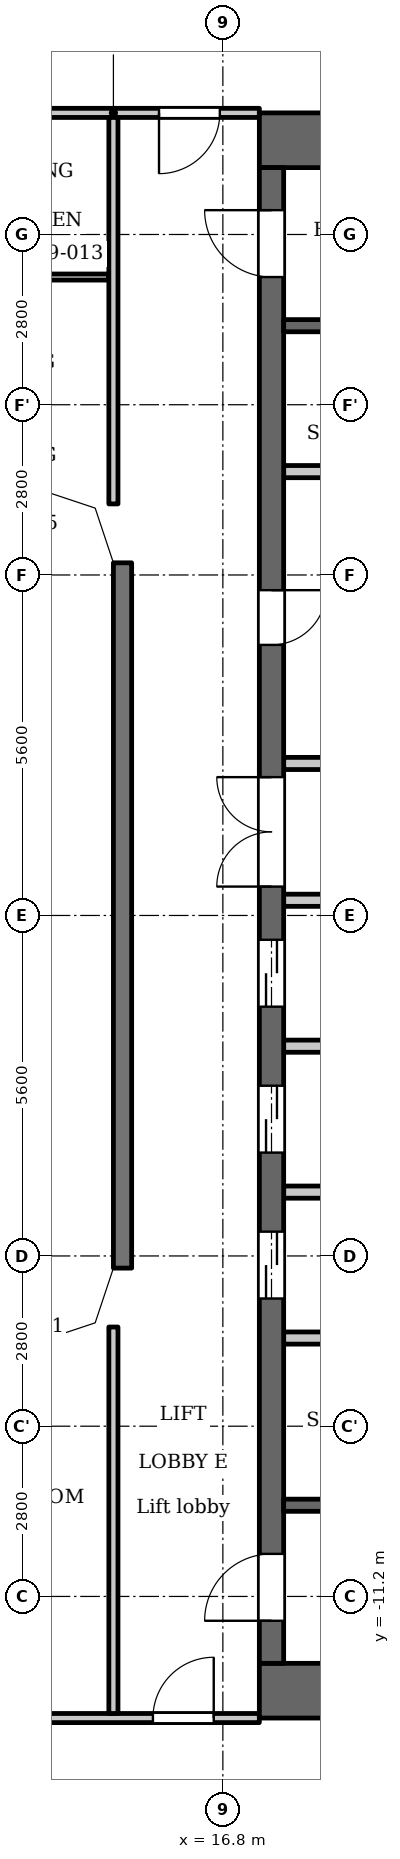
"""IFC4 building model, lengths in metres.
Left out: names, types, materials, properties, quantities, classifications, styles, units other than length and angle.
Written with IfcOpenShell. Run it as: python <this file> out.ifc"""

import sys

from ifc_helpers import new_model, si_unit, direction, frame, frame_2d, origin, place, context, subcontext, project, spatial, polyline, rectangle, outline, extrude, element, fill, save


model = new_model("IFC4")
c1 = context("Model", 3, precision=1e-05, world=origin(), true_north=direction((0.0, 1.0)))
c2 = subcontext(c1, "Body", "Model", "MODEL_VIEW")
j1 = project(units=[si_unit("LENGTHUNIT", "METRE"), si_unit("PLANEANGLEUNIT", "RADIAN")], contexts=[c1])
p1 = place(None, origin())
s1 = spatial("IfcSite", under=j1, at=p1, CompositionType="ELEMENT")
p2 = place(p1, origin())
s2 = spatial("IfcBuilding", under=s1, at=p2, CompositionType="ELEMENT")
p3 = place(p2, frame((0.0, 0.0, 114.8)))
s3 = spatial("IfcBuildingStorey", under=s2, at=p3, CompositionType="ELEMENT", Elevation=114.8)
p4 = place(p3, frame((15.15, 5.8, 0.0), z_axis=(0.0, 0.0, 1.0), x_axis=(0.0, -1.0, 0.0)))
e1 = element("IfcWall", 1, at=p4, inside=s3, PredefinedType="SOLIDWALL", context=c2, shape_type="SweptSolid", body=[
    extrude(rectangle(XDim=11.6, YDim=0.3, at=frame_2d((5.8, 0.0))), origin(), (0.0, 0.0, 1.0), 3.2),
])
for number, where, z_axis, x_axis in (
    (2, (17.4, 12.75, 0.0), (0.0, 0.0, 1.0), (1.0, 0.0, 0.0)),
    (3, (17.4, -12.75, 0.0), (0.0, 0.0, 1.0), (1.0, 0.0, 0.0)),
):
    element("IfcWall", number, at=place(p3, frame(where, z_axis=z_axis, x_axis=x_axis)), inside=s3, PredefinedType="SHEAR", context=c2, shape_type="SweptSolid", body=[
        extrude(rectangle(XDim=10.4, YDim=0.9, at=frame_2d((5.2, 0.0))), origin(), (0.0, 0.0, 1.0), 3.2),
    ])
p5 = place(p3, frame((17.6, -12.3, 0.0), z_axis=(0.0, 0.0, 1.0), x_axis=(0.0, 1.0, 0.0)))
e4 = element("IfcWall", 4, at=p5, inside=s3, PredefinedType="SHEAR", context=c2, shape_type="SweptSolid", body=[
    extrude(rectangle(XDim=24.6, YDim=0.4, at=frame_2d((12.3, 0.0))), origin(), (0.0, 0.0, 1.0), 3.2),
])
p6 = place(p5, frame((6.0, 0.0, 0.0)))
e5 = element("IfcOpeningElement", 5, at=p6, cuts=e4, PredefinedType="OPENING", context=c2, shape_type="SweptSolid", body=[
    extrude(rectangle(XDim=1.1, YDim=2.1, at=frame_2d((0.55, 1.05))), frame((0.0, 0.21, 0.0), z_axis=(0.0, -1.0, 0.0), x_axis=(1.0, 0.0, 0.0)), (0.0, 0.0, 1.0), 0.42),
])
p7 = place(p5, frame((8.4, 0.0, 0.0)))
e6 = element("IfcOpeningElement", 6, at=p7, cuts=e4, PredefinedType="OPENING", context=c2, shape_type="SweptSolid", body=[
    extrude(rectangle(XDim=1.1, YDim=2.1, at=frame_2d((0.55, 1.05))), frame((0.0, 0.21, 0.0), z_axis=(0.0, -1.0, 0.0), x_axis=(1.0, 0.0, 0.0)), (0.0, 0.0, 1.0), 0.42),
])
p8 = place(p5, frame((10.8, 0.0, 0.0)))
e7 = element("IfcOpeningElement", 7, at=p8, cuts=e4, PredefinedType="OPENING", context=c2, shape_type="SweptSolid", body=[
    extrude(rectangle(XDim=1.1, YDim=2.1, at=frame_2d((0.55, 1.05))), frame((0.0, 0.21, 0.0), z_axis=(0.0, -1.0, 0.0), x_axis=(1.0, 0.0, 0.0)), (0.0, 0.0, 1.0), 0.42),
])
p9 = place(p5, frame((16.75, 0.0, 0.0)))
e8 = element("IfcOpeningElement", 8, at=p9, cuts=e4, PredefinedType="OPENING", context=c2, shape_type="SweptSolid", body=[
    extrude(rectangle(XDim=0.9, YDim=2.1, at=frame_2d((0.45, 1.05))), frame((0.0, 0.21, 0.0), z_axis=(0.0, -1.0, 0.0), x_axis=(1.0, 0.0, 0.0)), (0.0, 0.0, 1.0), 0.42),
])
p10 = place(p5, frame((22.8, 0.0, 0.0)))
e9 = element("IfcOpeningElement", 9, at=p10, cuts=e4, PredefinedType="OPENING", context=c2, shape_type="SweptSolid", body=[
    extrude(rectangle(XDim=1.1, YDim=2.1, at=frame_2d((0.55, 1.05))), frame((0.0, 0.21, 0.0), z_axis=(0.0, -1.0, 0.0), x_axis=(1.0, 0.0, 0.0)), (0.0, 0.0, 1.0), 0.42),
])
p11 = place(p5, frame((0.7, 0.0, 0.0)))
e10 = element("IfcOpeningElement", 10, at=p11, cuts=e4, PredefinedType="OPENING", context=c2, shape_type="SweptSolid", body=[
    extrude(rectangle(XDim=1.1, YDim=2.1, at=frame_2d((0.55, 1.05))), frame((0.0, 0.21, 0.0), z_axis=(0.0, -1.0, 0.0), x_axis=(1.0, 0.0, 0.0)), (0.0, 0.0, 1.0), 0.42),
])
p12 = place(p5, frame((12.775, 0.0, 0.0)))
e11 = element("IfcOpeningElement", 11, at=p12, cuts=e4, PredefinedType="OPENING", context=c2, shape_type="SweptSolid", body=[
    extrude(rectangle(XDim=1.8, YDim=2.1, at=frame_2d((0.9, 1.05))), frame((0.0, 0.21, 0.0), z_axis=(0.0, -1.0, 0.0), x_axis=(1.0, 0.0, 0.0)), (0.0, 0.0, 1.0), 0.42),
])
p13 = place(p3, frame((17.8, -9.7, 0.0), z_axis=(0.0, 0.0, 1.0), x_axis=(1.0, 0.0, 0.0)))
e12 = element("IfcWall", 12, at=p13, inside=s3, PredefinedType="SHEAR", context=c2, shape_type="SweptSolid", body=[
    extrude(rectangle(XDim=8.3, YDim=0.2, at=frame_2d((4.15, 0.0))), origin(), (0.0, 0.0, 1.0), 3.2),
])
p14 = place(p13, frame((0.85, 0.0, 0.0)))
e13 = element("IfcOpeningElement", 13, at=p14, cuts=e12, PredefinedType="OPENING", context=c2, shape_type="SweptSolid", body=[
    extrude(rectangle(XDim=1.1, YDim=2.1, at=frame_2d((0.55, 1.05))), frame((0.0, 0.11, 0.0), z_axis=(0.0, -1.0, 0.0), x_axis=(1.0, 0.0, 0.0)), (0.0, 0.0, 1.0), 0.22),
])
p15 = place(p13, frame((3.75, 0.0, 0.0)))
e14 = element("IfcOpeningElement", 14, at=p15, cuts=e12, PredefinedType="OPENING", context=c2, shape_type="SweptSolid", body=[
    extrude(rectangle(XDim=1.1, YDim=2.1, at=frame_2d((0.55, 1.05))), frame((0.0, 0.11, 0.0), z_axis=(0.0, -1.0, 0.0), x_axis=(1.0, 0.0, 0.0)), (0.0, 0.0, 1.0), 0.22),
])
for number, where, z_axis, x_axis in (
    (15, (17.8, -6.95, 0.0), (0.0, 0.0, 1.0), (1.0, 0.0, 0.0)),
    (16, (17.8, -4.55, 0.0), (0.0, 0.0, 1.0), (1.0, 0.0, 0.0)),
    (17, (17.8, -2.15, 0.0), (0.0, 0.0, 1.0), (1.0, 0.0, 0.0)),
):
    element("IfcWall", number, at=place(p3, frame(where, z_axis=z_axis, x_axis=x_axis)), inside=s3, PredefinedType="PARTITIONING", context=c2, shape_type="SweptSolid", body=[
        extrude(rectangle(XDim=2.8, YDim=0.2, at=frame_2d((1.4, 0.0))), origin(), (0.0, 0.0, 1.0), 3.2),
    ])
for number, where, z_axis, x_axis in (
    (18, (17.8, 0.25, 0.0), (0.0, 0.0, 1.0), (1.0, 0.0, 0.0)),
    (19, (17.8, 2.5, 0.0), (0.0, 0.0, 1.0), (1.0, 0.0, 0.0)),
):
    element("IfcWall", number, at=place(p3, frame(where, z_axis=z_axis, x_axis=x_axis)), inside=s3, PredefinedType="PARTITIONING", context=c2, shape_type="SweptSolid", body=[
        extrude(rectangle(XDim=3.0, YDim=0.2, at=frame_2d((1.5, 0.0))), origin(), (0.0, 0.0, 1.0), 3.2),
    ])
p16 = place(p3, frame((17.8, 7.3, 0.0), z_axis=(0.0, 0.0, 1.0), x_axis=(1.0, 0.0, 0.0)))
e20 = element("IfcWall", 20, at=p16, inside=s3, PredefinedType="PARTITIONING", context=c2, shape_type="SweptSolid", body=[
    extrude(rectangle(XDim=2.8, YDim=0.2, at=frame_2d((1.4, 0.0))), origin(), (0.0, 0.0, 1.0), 3.2),
])
p17 = place(p3, frame((17.8, 9.7, 0.0), z_axis=(0.0, 0.0, 1.0), x_axis=(1.0, 0.0, 0.0)))
e21 = element("IfcWall", 21, at=p17, inside=s3, PredefinedType="SHEAR", context=c2, shape_type="SweptSolid", body=[
    extrude(rectangle(XDim=8.3, YDim=0.2, at=frame_2d((4.15, 0.0))), origin(), (0.0, 0.0, 1.0), 3.2),
])
p18 = place(p17, frame((0.85, 0.0, 0.0)))
e22 = element("IfcOpeningElement", 22, at=p18, cuts=e21, PredefinedType="OPENING", context=c2, shape_type="SweptSolid", body=[
    extrude(rectangle(XDim=1.1, YDim=2.1, at=frame_2d((0.55, 1.05))), frame((0.0, 0.11, 0.0), z_axis=(0.0, -1.0, 0.0), x_axis=(1.0, 0.0, 0.0)), (0.0, 0.0, 1.0), 0.22),
])
p19 = place(p17, frame((3.75, 0.0, 0.0)))
e23 = element("IfcOpeningElement", 23, at=p19, cuts=e21, PredefinedType="OPENING", context=c2, shape_type="SweptSolid", body=[
    extrude(rectangle(XDim=1.1, YDim=2.1, at=frame_2d((0.55, 1.05))), frame((0.0, 0.11, 0.0), z_axis=(0.0, -1.0, 0.0), x_axis=(1.0, 0.0, 0.0)), (0.0, 0.0, 1.0), 0.22),
])
p20 = place(p3, frame((-17.4, -13.2, 0.0), z_axis=(0.0, 0.0, 1.0), x_axis=(1.0, 0.0, 0.0)))
e24 = element("IfcWall", 24, at=p20, inside=s3, PredefinedType="PARTITIONING", context=c2, shape_type="SweptSolid", body=[
    extrude(rectangle(XDim=34.8, YDim=0.15, at=frame_2d((17.4, 0.0))), origin(), (0.0, 0.0, 1.0), 3.2),
])
p21 = place(p20, frame((0.65, 0.0, 0.0)))
e25 = element("IfcOpeningElement", 25, at=p21, cuts=e24, PredefinedType="OPENING", context=c2, shape_type="SweptSolid", body=[
    extrude(rectangle(XDim=1.0, YDim=2.1, at=frame_2d((0.5, 1.05))), frame((0.0, 0.085, 0.0), z_axis=(0.0, -1.0, 0.0), x_axis=(1.0, 0.0, 0.0)), (0.0, 0.0, 1.0), 0.17),
])
p22 = place(p20, frame((33.05, 0.0, 0.0)))
e26 = element("IfcOpeningElement", 26, at=p22, cuts=e24, PredefinedType="OPENING", context=c2, shape_type="SweptSolid", body=[
    extrude(rectangle(XDim=1.0, YDim=2.1, at=frame_2d((0.5, 1.05))), frame((0.0, 0.085, 0.0), z_axis=(0.0, -1.0, 0.0), x_axis=(1.0, 0.0, 0.0)), (0.0, 0.0, 1.0), 0.17),
])
p23 = place(p20, frame((4.55, 0.0, 0.0)))
e27 = element("IfcOpeningElement", 27, at=p23, cuts=e24, PredefinedType="OPENING", context=c2, shape_type="SweptSolid", body=[
    extrude(rectangle(XDim=1.0, YDim=2.1, at=frame_2d((0.5, 1.05))), frame((0.0, 0.085, 0.0), z_axis=(0.0, -1.0, 0.0), x_axis=(1.0, 0.0, 0.0)), (0.0, 0.0, 1.0), 0.17),
])
p24 = place(p20, frame((6.9, 0.0, 0.0)))
e28 = element("IfcOpeningElement", 28, at=p24, cuts=e24, PredefinedType="OPENING", context=c2, shape_type="SweptSolid", body=[
    extrude(rectangle(XDim=1.0, YDim=2.1, at=frame_2d((0.5, 1.05))), frame((0.0, 0.085, 0.0), z_axis=(0.0, -1.0, 0.0), x_axis=(1.0, 0.0, 0.0)), (0.0, 0.0, 1.0), 0.17),
])
p25 = place(p20, frame((15.75, 0.0, 0.0)))
e29 = element("IfcOpeningElement", 29, at=p25, cuts=e24, PredefinedType="OPENING", context=c2, shape_type="SweptSolid", body=[
    extrude(rectangle(XDim=1.0, YDim=2.1, at=frame_2d((0.5, 1.05))), frame((0.0, 0.085, 0.0), z_axis=(0.0, -1.0, 0.0), x_axis=(1.0, 0.0, 0.0)), (0.0, 0.0, 1.0), 0.17),
])
p26 = place(p20, frame((18.1, 0.0, 0.0)))
e30 = element("IfcOpeningElement", 30, at=p26, cuts=e24, PredefinedType="OPENING", context=c2, shape_type="SweptSolid", body=[
    extrude(rectangle(XDim=1.0, YDim=2.1, at=frame_2d((0.5, 1.05))), frame((0.0, 0.085, 0.0), z_axis=(0.0, -1.0, 0.0), x_axis=(1.0, 0.0, 0.0)), (0.0, 0.0, 1.0), 0.17),
])
p27 = place(p20, frame((26.95, 0.0, 0.0)))
e31 = element("IfcOpeningElement", 31, at=p27, cuts=e24, PredefinedType="OPENING", context=c2, shape_type="SweptSolid", body=[
    extrude(rectangle(XDim=1.0, YDim=2.1, at=frame_2d((0.5, 1.05))), frame((0.0, 0.085, 0.0), z_axis=(0.0, -1.0, 0.0), x_axis=(1.0, 0.0, 0.0)), (0.0, 0.0, 1.0), 0.17),
])
p28 = place(p20, frame((29.25, 0.0, 0.0)))
e32 = element("IfcOpeningElement", 32, at=p28, cuts=e24, PredefinedType="OPENING", context=c2, shape_type="SweptSolid", body=[
    extrude(rectangle(XDim=1.0, YDim=2.1, at=frame_2d((0.5, 1.05))), frame((0.0, 0.085, 0.0), z_axis=(0.0, -1.0, 0.0), x_axis=(1.0, 0.0, 0.0)), (0.0, 0.0, 1.0), 0.17),
])
p29 = place(p3, frame((-14.925, 10.5, 0.0), z_axis=(0.0, 0.0, 1.0), x_axis=(1.0, 0.0, 0.0)))
e33 = element("IfcWall", 33, at=p29, inside=s3, PredefinedType="PARTITIONING", context=c2, shape_type="SweptSolid", body=[
    extrude(rectangle(XDim=29.85, YDim=0.1, at=frame_2d((14.925, 0.0))), origin(), (0.0, 0.0, 1.0), 3.2),
])
p30 = place(p29, frame((0.525, 0.0, 0.0)))
e34 = element("IfcOpeningElement", 34, at=p30, cuts=e33, PredefinedType="OPENING", context=c2, shape_type="SweptSolid", body=[
    extrude(rectangle(XDim=0.8, YDim=2.1, at=frame_2d((0.4, 1.05))), frame((0.0, 0.06, 0.0), z_axis=(0.0, -1.0, 0.0), x_axis=(1.0, 0.0, 0.0)), (0.0, 0.0, 1.0), 0.12),
])
p31 = place(p29, frame((4.375, 0.0, 0.0)))
e35 = element("IfcOpeningElement", 35, at=p31, cuts=e33, PredefinedType="OPENING", context=c2, shape_type="SweptSolid", body=[
    extrude(rectangle(XDim=0.9, YDim=2.1, at=frame_2d((0.45, 1.05))), frame((0.0, 0.06, 0.0), z_axis=(0.0, -1.0, 0.0), x_axis=(1.0, 0.0, 0.0)), (0.0, 0.0, 1.0), 0.12),
])
p32 = place(p29, frame((18.825, 0.0, 0.0)))
e36 = element("IfcOpeningElement", 36, at=p32, cuts=e33, PredefinedType="OPENING", context=c2, shape_type="SweptSolid", body=[
    extrude(rectangle(XDim=0.8, YDim=2.1, at=frame_2d((0.4, 1.05))), frame((0.0, 0.06, 0.0), z_axis=(0.0, -1.0, 0.0), x_axis=(1.0, 0.0, 0.0)), (0.0, 0.0, 1.0), 0.12),
])
p33 = place(p29, frame((16.325, 0.0, 0.0)))
e37 = element("IfcOpeningElement", 37, at=p33, cuts=e33, PredefinedType="OPENING", context=c2, shape_type="SweptSolid", body=[
    extrude(rectangle(XDim=0.9, YDim=2.1, at=frame_2d((0.45, 1.05))), frame((0.0, 0.06, 0.0), z_axis=(0.0, -1.0, 0.0), x_axis=(1.0, 0.0, 0.0)), (0.0, 0.0, 1.0), 0.12),
])
p34 = place(p29, frame((10.225, 0.0, 0.0)))
e38 = element("IfcOpeningElement", 38, at=p34, cuts=e33, PredefinedType="OPENING", context=c2, shape_type="SweptSolid", body=[
    extrude(rectangle(XDim=0.9, YDim=2.1, at=frame_2d((0.45, 1.05))), frame((0.0, 0.06, 0.0), z_axis=(0.0, -1.0, 0.0), x_axis=(1.0, 0.0, 0.0)), (0.0, 0.0, 1.0), 0.12),
])
p35 = place(p29, frame((13.325, 0.0, 0.0)))
e39 = element("IfcOpeningElement", 39, at=p35, cuts=e33, PredefinedType="OPENING", context=c2, shape_type="SweptSolid", body=[
    extrude(rectangle(XDim=0.9, YDim=2.1, at=frame_2d((0.45, 1.05))), frame((0.0, 0.06, 0.0), z_axis=(0.0, -1.0, 0.0), x_axis=(1.0, 0.0, 0.0)), (0.0, 0.0, 1.0), 0.12),
])
p36 = place(p29, frame((21.175, 0.0, 0.0)))
e40 = element("IfcOpeningElement", 40, at=p36, cuts=e33, PredefinedType="OPENING", context=c2, shape_type="SweptSolid", body=[
    extrude(rectangle(XDim=0.8, YDim=2.1, at=frame_2d((0.4, 1.05))), frame((0.0, 0.06, 0.0), z_axis=(0.0, -1.0, 0.0), x_axis=(1.0, 0.0, 0.0)), (0.0, 0.0, 1.0), 0.12),
])
p37 = place(p29, frame((26.775, 0.0, 0.0)))
e41 = element("IfcOpeningElement", 41, at=p37, cuts=e33, PredefinedType="OPENING", context=c2, shape_type="SweptSolid", body=[
    extrude(rectangle(XDim=0.9, YDim=2.1, at=frame_2d((0.45, 1.05))), frame((0.0, 0.06, 0.0), z_axis=(0.0, -1.0, 0.0), x_axis=(1.0, 0.0, 0.0)), (0.0, 0.0, 1.0), 0.12),
])
p38 = place(p3, frame((-17.4, 13.2, 0.0), z_axis=(0.0, 0.0, 1.0), x_axis=(1.0, 0.0, 0.0)))
e42 = element("IfcWall", 42, at=p38, inside=s3, PredefinedType="PARTITIONING", context=c2, shape_type="SweptSolid", body=[
    extrude(rectangle(XDim=34.8, YDim=0.15, at=frame_2d((17.4, 0.0))), origin(), (0.0, 0.0, 1.0), 3.2),
])
p39 = place(p38, frame((0.75, 0.0, 0.0)))
e43 = element("IfcOpeningElement", 43, at=p39, cuts=e42, PredefinedType="OPENING", context=c2, shape_type="SweptSolid", body=[
    extrude(rectangle(XDim=1.0, YDim=2.1, at=frame_2d((0.5, 1.05))), frame((0.0, 0.085, 0.0), z_axis=(0.0, -1.0, 0.0), x_axis=(1.0, 0.0, 0.0)), (0.0, 0.0, 1.0), 0.17),
])
p40 = place(p38, frame((33.15, 0.0, 0.0)))
e44 = element("IfcOpeningElement", 44, at=p40, cuts=e42, PredefinedType="OPENING", context=c2, shape_type="SweptSolid", body=[
    extrude(rectangle(XDim=1.0, YDim=2.1, at=frame_2d((0.5, 1.05))), frame((0.0, 0.085, 0.0), z_axis=(0.0, -1.0, 0.0), x_axis=(1.0, 0.0, 0.0)), (0.0, 0.0, 1.0), 0.17),
])
p41 = place(p38, frame((6.85, 0.0, 0.0)))
e45 = element("IfcOpeningElement", 45, at=p41, cuts=e42, PredefinedType="OPENING", context=c2, shape_type="SweptSolid", body=[
    extrude(rectangle(XDim=1.0, YDim=2.1, at=frame_2d((0.5, 1.05))), frame((0.0, 0.085, 0.0), z_axis=(0.0, -1.0, 0.0), x_axis=(1.0, 0.0, 0.0)), (0.0, 0.0, 1.0), 0.17),
])
p42 = place(p38, frame((12.45, 0.0, 0.0)))
e46 = element("IfcOpeningElement", 46, at=p42, cuts=e42, PredefinedType="OPENING", context=c2, shape_type="SweptSolid", body=[
    extrude(rectangle(XDim=1.0, YDim=2.1, at=frame_2d((0.5, 1.05))), frame((0.0, 0.085, 0.0), z_axis=(0.0, -1.0, 0.0), x_axis=(1.0, 0.0, 0.0)), (0.0, 0.0, 1.0), 0.17),
])
p43 = place(p38, frame((29.25, 0.0, 0.0)))
e47 = element("IfcOpeningElement", 47, at=p43, cuts=e42, PredefinedType="OPENING", context=c2, shape_type="SweptSolid", body=[
    extrude(rectangle(XDim=1.0, YDim=2.1, at=frame_2d((0.5, 1.05))), frame((0.0, 0.085, 0.0), z_axis=(0.0, -1.0, 0.0), x_axis=(1.0, 0.0, 0.0)), (0.0, 0.0, 1.0), 0.17),
])
for number, where, z_axis, x_axis in (
    (48, (15.0, -13.125, 0.0), (0.0, 0.0, 1.0), (0.0, 1.0, 0.0)),
    (49, (15.0, 6.769, 0.0), (0.0, 0.0, 1.0), (0.0, 1.0, 0.0)),
):
    element("IfcWall", number, at=place(p3, frame(where, z_axis=z_axis, x_axis=x_axis)), inside=s3, PredefinedType="PARTITIONING", context=c2, shape_type="SweptSolid", body=[
        extrude(rectangle(XDim=6.356, YDim=0.15, at=frame_2d((3.178, 0.0))), origin(), (0.0, 0.0, 1.0), 3.2),
    ])
p44 = place(p3, origin())
e50 = element("IfcWall", 50, at=p44, inside=s3, PredefinedType="SOLIDWALL", context=c2, shape_type="SweptSolid", body=[
    extrude(outline(polyline([(14.937, 6.937), (13.849, 7.3), (13.8, 7.3), (13.8, 7.0), (14.7, 6.7), (15.0, 5.8), (15.3, 5.8), (15.3, 5.849), (14.937, 6.937)])), origin(), (0.0, 0.0, 1.0), 3.2),
])
e51 = element("IfcWall", 51, at=p44, inside=s3, PredefinedType="SOLIDWALL", context=c2, shape_type="SweptSolid", body=[
    extrude(outline(polyline([(14.937, -6.937), (15.3, -5.849), (15.3, -5.8), (15.0, -5.8), (14.7, -6.7), (13.8, -7.0), (13.8, -7.3), (13.849, -7.3), (14.937, -6.937)])), origin(), (0.0, 0.0, 1.0), 3.2),
])
p45 = place(p6, origin())
e52 = element("IfcDoor", 52, at=p45, inside=s3, OperationType="DOUBLE_DOOR_SLIDING", PredefinedType="DOOR", context=c2, shape_type="SweptSolid", body=[
    extrude(rectangle(XDim=1.1, YDim=2.1, at=frame_2d((0.55, 1.05))), frame((0.0, 0.025, 0.0), z_axis=(0.0, -1.0, 0.0), x_axis=(1.0, 0.0, 0.0)), (0.0, 0.0, 1.0), 0.05),
])
fill(e5, e52)
p46 = place(p7, origin())
e53 = element("IfcDoor", 53, at=p46, inside=s3, OperationType="DOUBLE_DOOR_SLIDING", PredefinedType="DOOR", context=c2, shape_type="SweptSolid", body=[
    extrude(rectangle(XDim=1.1, YDim=2.1, at=frame_2d((0.55, 1.05))), frame((0.0, 0.025, 0.0), z_axis=(0.0, -1.0, 0.0), x_axis=(1.0, 0.0, 0.0)), (0.0, 0.0, 1.0), 0.05),
])
fill(e6, e53)
p47 = place(p8, origin())
e54 = element("IfcDoor", 54, at=p47, inside=s3, OperationType="DOUBLE_DOOR_SLIDING", PredefinedType="DOOR", context=c2, shape_type="SweptSolid", body=[
    extrude(rectangle(XDim=1.1, YDim=2.1, at=frame_2d((0.55, 1.05))), frame((0.0, 0.025, 0.0), z_axis=(0.0, -1.0, 0.0), x_axis=(1.0, 0.0, 0.0)), (0.0, 0.0, 1.0), 0.05),
])
fill(e7, e54)
p48 = place(p9, origin())
e55 = element("IfcDoor", 55, at=p48, inside=s3, OperationType="SINGLE_SWING_RIGHT", PredefinedType="DOOR", context=c2, shape_type="SweptSolid", body=[
    extrude(rectangle(XDim=0.9, YDim=2.1, at=frame_2d((0.45, 1.05))), frame((0.0, 0.025, 0.0), z_axis=(0.0, -1.0, 0.0), x_axis=(1.0, 0.0, 0.0)), (0.0, 0.0, 1.0), 0.05),
])
fill(e8, e55)
p49 = place(p10, origin())
e56 = element("IfcDoor", 56, at=p49, inside=s3, OperationType="SINGLE_SWING_LEFT", PredefinedType="DOOR", context=c2, shape_type="SweptSolid", body=[
    extrude(rectangle(XDim=1.1, YDim=2.1, at=frame_2d((0.55, 1.05))), frame((0.0, 0.025, 0.0), z_axis=(0.0, -1.0, 0.0), x_axis=(1.0, 0.0, 0.0)), (0.0, 0.0, 1.0), 0.05),
])
fill(e9, e56)
p50 = place(p11, origin())
e57 = element("IfcDoor", 57, at=p50, inside=s3, OperationType="SINGLE_SWING_RIGHT", PredefinedType="DOOR", context=c2, shape_type="SweptSolid", body=[
    extrude(rectangle(XDim=1.1, YDim=2.1, at=frame_2d((0.55, 1.05))), frame((0.0, 0.025, 0.0), z_axis=(0.0, -1.0, 0.0), x_axis=(1.0, 0.0, 0.0)), (0.0, 0.0, 1.0), 0.05),
])
fill(e10, e57)
p51 = place(p12, origin())
e58 = element("IfcDoor", 58, at=p51, inside=s3, OperationType="DOUBLE_DOOR_SINGLE_SWING", PredefinedType="DOOR", context=c2, shape_type="SweptSolid", body=[
    extrude(rectangle(XDim=1.8, YDim=2.1, at=frame_2d((0.9, 1.05))), frame((0.0, 0.025, 0.0), z_axis=(0.0, -1.0, 0.0), x_axis=(1.0, 0.0, 0.0)), (0.0, 0.0, 1.0), 0.05),
])
fill(e11, e58)
p52 = place(p40, origin())
e59 = element("IfcDoor", 59, at=p52, inside=s3, OperationType="SINGLE_SWING_LEFT", PredefinedType="DOOR", context=c2, shape_type="SweptSolid", body=[
    extrude(rectangle(XDim=1.0, YDim=2.1, at=frame_2d((0.5, 1.05))), frame((0.0, 0.025, 0.0), z_axis=(0.0, -1.0, 0.0), x_axis=(1.0, 0.0, 0.0)), (0.0, 0.0, 1.0), 0.05),
])
fill(e44, e59)
p53 = place(p22, origin())
e60 = element("IfcDoor", 60, at=p53, inside=s3, OperationType="SINGLE_SWING_LEFT", PredefinedType="DOOR", context=c2, shape_type="SweptSolid", body=[
    extrude(rectangle(XDim=1.0, YDim=2.1, at=frame_2d((0.5, 1.05))), frame((0.0, 0.025, 0.0), z_axis=(0.0, -1.0, 0.0), x_axis=(1.0, 0.0, 0.0)), (0.0, 0.0, 1.0), 0.05),
])
fill(e26, e60)
save(model, sys.argv[1])
